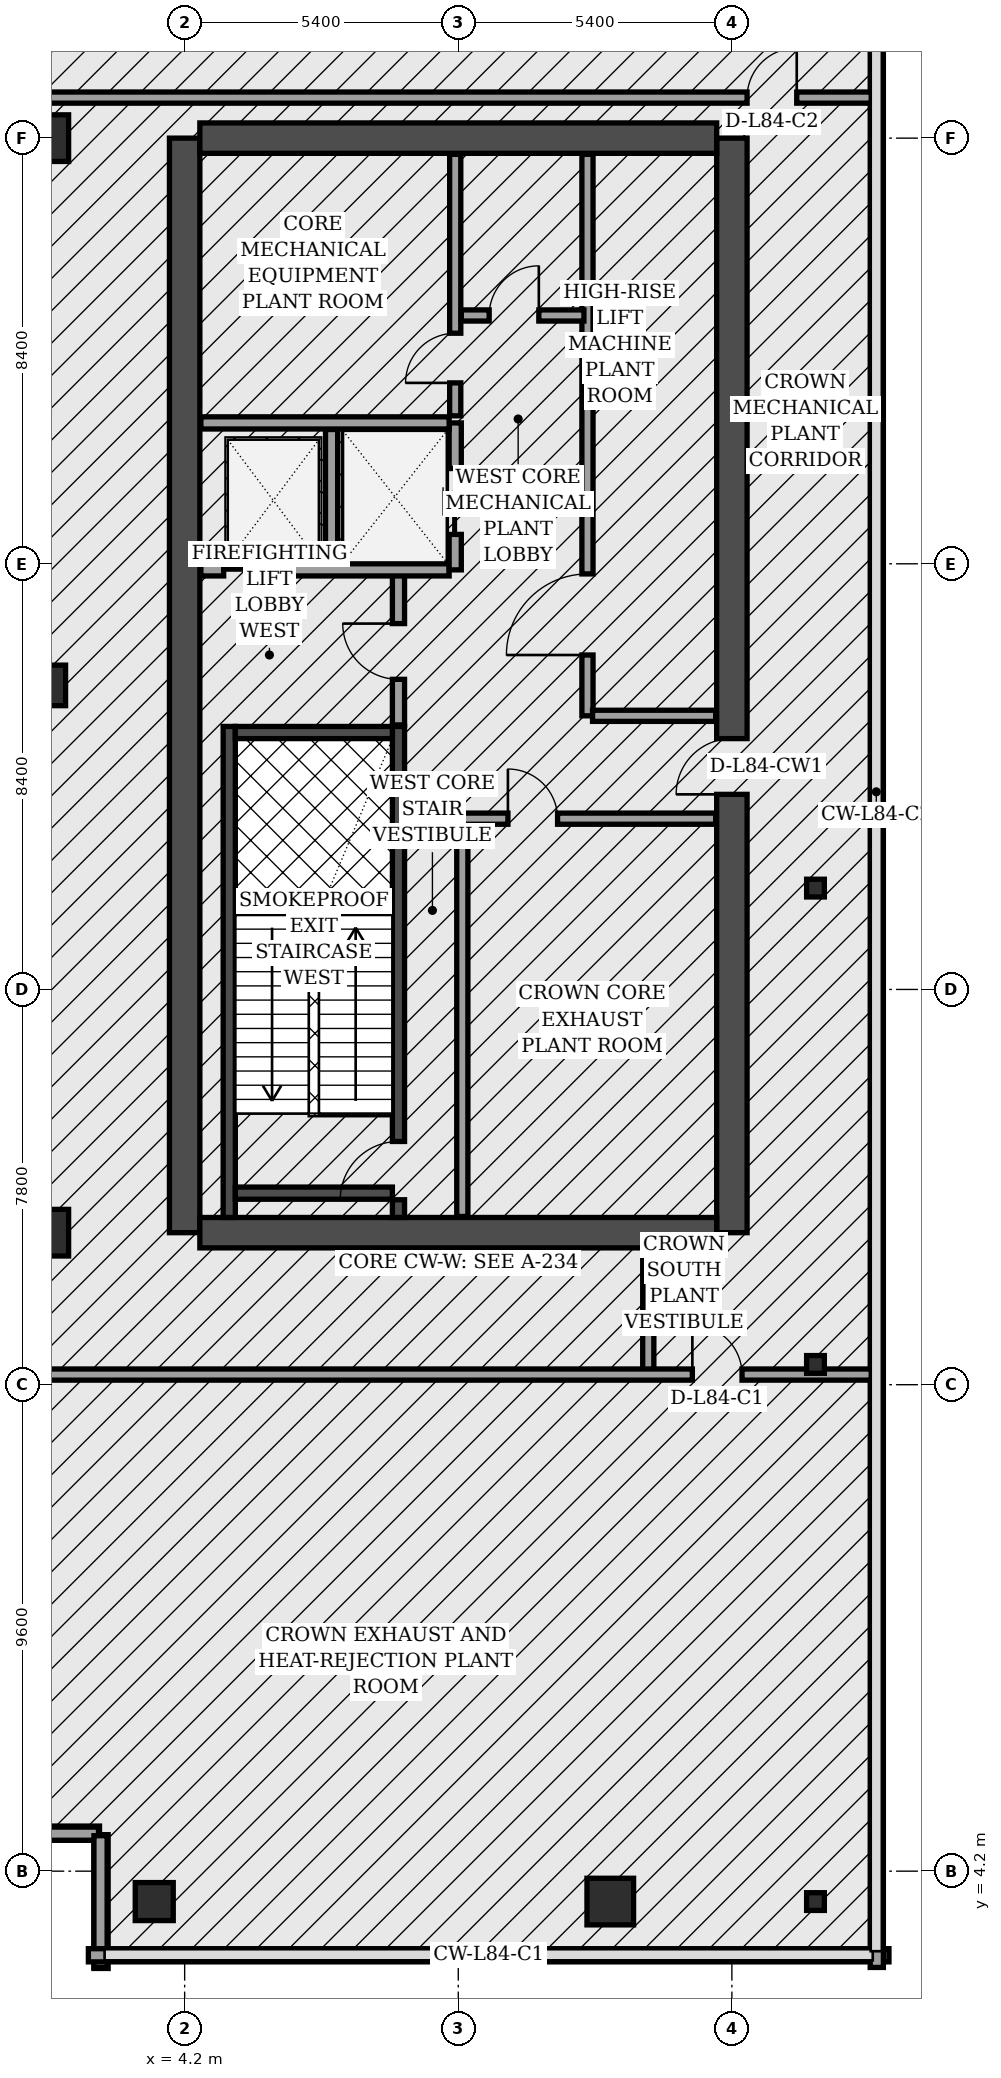
"""IFC4 building model, lengths in metres.
Left out: names, types, materials, properties, quantities, classifications, styles, units other than length and angle.
Written with IfcOpenShell. Run it as: python <this file> out.ifc"""

import sys

from ifc_helpers import new_model, si_unit, direction, frame, frame_2d, origin, origin_2d, place, context, subcontext, project, spatial, rectangle, hollow_rectangle, i_section, extrude, element, fill, save


model = new_model("IFC4")
c1 = context("Model", 3, precision=1e-05, world=origin(), true_north=direction((0.0, 1.0)))
c2 = subcontext(c1, "Body", "Model", "MODEL_VIEW")
j1 = project(units=[si_unit("LENGTHUNIT", "METRE"), si_unit("PLANEANGLEUNIT", "RADIAN")], contexts=[c1])
p1 = place(None, origin())
s1 = spatial("IfcSite", under=j1, at=p1, CompositionType="ELEMENT")
p2 = place(p1, origin())
s2 = spatial("IfcBuilding", under=s1, at=p2, CompositionType="ELEMENT")
p3 = place(p2, frame((0.0, 0.0, 345.5)))
s3 = spatial("IfcBuildingStorey", under=s2, at=p3, CompositionType="ELEMENT", Elevation=345.5)
p4 = place(p3, frame((4.2, 16.8, 0.0), z_axis=(0.0, 0.0, 1.0), x_axis=(0.0, 1.0, 0.0)))
e1 = element("IfcWall", 1, at=p4, inside=s3, PredefinedType="SHEAR", context=c2, shape_type="SweptSolid", body=[
    extrude(rectangle(XDim=21.6, YDim=0.6, at=frame_2d((10.8, 0.0))), origin(), (0.0, 0.0, 1.0), 4.75),
])
p5 = place(p3, frame((15.0, 16.8, 0.0), z_axis=(0.0, 0.0, 1.0), x_axis=(0.0, 1.0, 0.0)))
e2 = element("IfcWall", 2, at=p5, inside=s3, PredefinedType="SHEAR", context=c2, shape_type="SweptSolid", body=[
    extrude(rectangle(XDim=21.6, YDim=0.6, at=frame_2d((10.8, 0.0))), origin(), (0.0, 0.0, 1.0), 4.75),
])
p6 = place(p5, frame((8.65, 0.0, 0.0)))
e3 = element("IfcOpeningElement", 3, at=p6, cuts=e2, PredefinedType="OPENING", context=c2, shape_type="SweptSolid", body=[
    extrude(rectangle(XDim=1.1, YDim=2.2, at=frame_2d((0.55, 1.1))), frame((0.0, 0.31, 0.0), z_axis=(0.0, -1.0, 0.0), x_axis=(1.0, 0.0, 0.0)), (0.0, 0.0, 1.0), 0.62),
])
for number, where, z_axis, x_axis in (
    (4, (4.5, 38.4, 0.0), (0.0, 0.0, 1.0), (1.0, 0.0, 0.0)),
    (5, (4.5, 16.8, 0.0), (0.0, 0.0, 1.0), (1.0, 0.0, 0.0)),
):
    element("IfcWall", number, at=place(p3, frame(where, z_axis=z_axis, x_axis=x_axis)), inside=s3, PredefinedType="SHEAR", context=c2, shape_type="SweptSolid", body=[
        extrude(rectangle(XDim=10.2, YDim=0.6, at=frame_2d((5.1, 0.0))), origin(), (0.0, 0.0, 1.0), 4.75),
    ])
p7 = place(p3, frame((5.08, 17.1, 0.0), z_axis=(0.0, 0.0, 1.0), x_axis=(0.0, 1.0, 0.0)))
e6 = element("IfcWall", 6, at=p7, inside=s3, PredefinedType="SOLIDWALL", context=c2, shape_type="SweptSolid", body=[
    extrude(rectangle(XDim=9.69, YDim=0.24, at=frame_2d((4.845, 0.0))), origin(), (0.0, 0.0, 1.0), 4.75),
])
p8 = place(p3, frame((8.42, 17.1, 0.0), z_axis=(0.0, 0.0, 1.0), x_axis=(0.0, 1.0, 0.0)))
e7 = element("IfcWall", 7, at=p8, inside=s3, PredefinedType="SOLIDWALL", context=c2, shape_type="SweptSolid", body=[
    extrude(rectangle(XDim=9.69, YDim=0.24, at=frame_2d((4.845, 0.0))), origin(), (0.0, 0.0, 1.0), 4.75),
])
p9 = place(p8, frame((0.35, 0.0, 0.0)))
e8 = element("IfcOpeningElement", 8, at=p9, cuts=e7, PredefinedType="OPENING", context=c2, shape_type="SweptSolid", body=[
    extrude(rectangle(XDim=1.15, YDim=2.2, at=frame_2d((0.575, 1.1))), frame((0.0, 0.13, 0.0), z_axis=(0.0, -1.0, 0.0), x_axis=(1.0, 0.0, 0.0)), (0.0, 0.0, 1.0), 0.26),
])
for number, where, z_axis, x_axis in (
    (9, (5.2, 17.58, 0.0), (0.0, 0.0, 1.0), (1.0, 0.0, 0.0)),
    (10, (5.2, 26.67, 0.0), (0.0, 0.0, 1.0), (1.0, 0.0, 0.0)),
):
    element("IfcWall", number, at=place(p3, frame(where, z_axis=z_axis, x_axis=x_axis)), inside=s3, PredefinedType="SOLIDWALL", context=c2, shape_type="SweptSolid", body=[
        extrude(rectangle(XDim=3.1, YDim=0.24, at=frame_2d((1.55, 0.0))), origin(), (0.0, 0.0, 1.0), 4.75),
    ])
p10 = place(p3, frame((3.6, 3.6, 0.0), z_axis=(0.0, 0.0, 1.0), x_axis=(1.0, 0.0, 0.0)))
e11 = element("IfcColumn", 11, at=p10, inside=s3, PredefinedType="COLUMN", context=c2, shape_type="SweptSolid", body=[
    extrude(hollow_rectangle(XDim=0.75, YDim=0.75, WallThickness=0.032, at=origin_2d()), origin(), (0.0, 0.0, 1.0), 4.75),
])
p11 = place(p3, frame((1.45, 16.8, 0.0), z_axis=(0.0, 0.0, 1.0), x_axis=(1.0, 0.0, 0.0)))
e12 = element("IfcColumn", 12, at=p11, inside=s3, PredefinedType="COLUMN", context=c2, shape_type="SweptSolid", body=[
    extrude(rectangle(XDim=0.92, YDim=0.92, at=origin_2d()), origin(), (0.0, 0.0, 1.0), 4.75),
])
p12 = place(p3, frame((1.45, 27.6, 0.0), z_axis=(0.0, 0.0, 1.0), x_axis=(1.0, 0.0, 0.0)))
e13 = element("IfcColumn", 13, at=p12, inside=s3, PredefinedType="COLUMN", context=c2, shape_type="SweptSolid", body=[
    extrude(rectangle(XDim=0.8, YDim=0.8, at=origin_2d()), origin(), (0.0, 0.0, 1.0), 4.75),
])
for number, where, z_axis, x_axis in (
    (14, (1.45, 38.4, 0.0), (0.0, 0.0, 1.0), (1.0, 0.0, 0.0)),
    (15, (12.6, 3.6, 0.0), (0.0, 0.0, 1.0), (1.0, 0.0, 0.0)),
):
    element("IfcColumn", number, at=place(p3, frame(where, z_axis=z_axis, x_axis=x_axis)), inside=s3, PredefinedType="COLUMN", context=c2, shape_type="SweptSolid", body=[
        extrude(rectangle(XDim=0.92, YDim=0.92, at=origin_2d()), origin(), (0.0, 0.0, 1.0), 4.75),
    ])
for number, where, z_axis, x_axis in (
    (16, (16.65, 3.6, 0.0), (0.0, 0.0, 1.0), (1.0, 0.0, 0.0)),
    (17, (16.65, 14.2, 0.0), (0.0, 0.0, 1.0), (1.0, 0.0, 0.0)),
    (18, (16.65, 23.6, 0.0), (0.0, 0.0, 1.0), (1.0, 0.0, 0.0)),
):
    element("IfcColumn", number, at=place(p3, frame(where, z_axis=z_axis, x_axis=x_axis)), inside=s3, PredefinedType="COLUMN", context=c2, shape_type="SweptSolid", body=[
        extrude(i_section(OverallWidth=0.35, OverallDepth=0.35, WebThickness=0.012, FlangeThickness=0.019, FilletRadius=0.018, at=origin_2d()), origin(), (0.0, 0.0, 1.0), 4.75),
    ])
p13 = place(p3, frame((-0.12, 4.95, 0.0), z_axis=(0.0, 0.0, 1.0), x_axis=(1.0, 0.0, 0.0)))
e19 = element("IfcWall", 19, at=p13, inside=s3, PredefinedType="SOLIDWALL", context=c2, shape_type="SweptSolid", body=[
    extrude(rectangle(XDim=2.64, YDim=0.28, at=frame_2d((1.32, 0.0))), origin(), (0.0, 0.0, 1.0), 4.75),
])
p14 = place(p3, frame((2.55, 4.92, 0.0), z_axis=(0.0, 0.0, 1.0), x_axis=(0.0, -1.0, 0.0)))
e20 = element("IfcWall", 20, at=p14, inside=s3, PredefinedType="SOLIDWALL", context=c2, shape_type="SweptSolid", body=[
    extrude(rectangle(XDim=2.64, YDim=0.28, at=frame_2d((1.32, 0.0))), origin(), (0.0, 0.0, 1.0), 4.75),
])
p15 = place(p3, frame((-0.1, 4.94, 5.0), z_axis=(0.0, 0.0, 1.0), x_axis=(1.0, 0.0, 0.0)))
e21 = element("IfcWall", 21, at=p15, inside=s3, PredefinedType="PARAPET", context=c2, shape_type="SweptSolid", body=[
    extrude(rectangle(XDim=2.6, YDim=0.26, at=frame_2d((1.3, 0.0))), origin(), (0.0, 0.0, 1.0), 1.55),
])
p16 = place(p3, frame((2.54, 4.9, 5.0), z_axis=(0.0, 0.0, 1.0), x_axis=(0.0, -1.0, 0.0)))
e22 = element("IfcWall", 22, at=p16, inside=s3, PredefinedType="PARAPET", context=c2, shape_type="SweptSolid", body=[
    extrude(rectangle(XDim=2.6, YDim=0.26, at=frame_2d((1.3, 0.0))), origin(), (0.0, 0.0, 1.0), 1.55),
])
p17 = place(p3, frame((2.3, 2.54, 5.0), z_axis=(0.0, 0.0, 1.0), x_axis=(1.0, 0.0, 0.0)))
e23 = element("IfcWall", 23, at=p17, inside=s3, PredefinedType="PARAPET", context=c2, shape_type="SweptSolid", body=[
    extrude(rectangle(XDim=15.8, YDim=0.26, at=frame_2d((7.9, 0.0))), origin(), (0.0, 0.0, 1.0), 1.55),
])
p18 = place(p3, frame((17.86, 2.3, 5.0), z_axis=(0.0, 0.0, 1.0), x_axis=(0.0, 1.0, 0.0)))
e24 = element("IfcWall", 24, at=p18, inside=s3, PredefinedType="PARAPET", context=c2, shape_type="SweptSolid", body=[
    extrude(rectangle(XDim=46.4, YDim=0.26, at=frame_2d((23.2, 0.0))), origin(), (0.0, 0.0, 1.0), 1.55),
])
p19 = place(p3, frame((8.42, 26.82, 0.0), z_axis=(0.0, 0.0, 1.0), x_axis=(0.0, 1.0, 0.0)))
e25 = element("IfcWall", 25, at=p19, inside=s3, PredefinedType="SOLIDWALL", context=c2, shape_type="SweptSolid", body=[
    extrude(rectangle(XDim=3.0, YDim=0.24, at=frame_2d((1.5, 0.0))), origin(), (0.0, 0.0, 1.0), 4.75),
])
p20 = place(p19, frame((0.9, 0.0, 0.0)))
e26 = element("IfcOpeningElement", 26, at=p20, cuts=e25, PredefinedType="OPENING", context=c2, shape_type="SweptSolid", body=[
    extrude(rectangle(XDim=1.1, YDim=2.2, at=frame_2d((0.55, 1.1))), frame((0.0, 0.13, 0.0), z_axis=(0.0, -1.0, 0.0), x_axis=(1.0, 0.0, 0.0)), (0.0, 0.0, 1.0), 0.26),
])
p21 = place(p3, frame((4.52, 29.88, 0.0), z_axis=(0.0, 0.0, 1.0), x_axis=(1.0, 0.0, 0.0)))
e27 = element("IfcWall", 27, at=p21, inside=s3, PredefinedType="SOLIDWALL", context=c2, shape_type="SweptSolid", body=[
    extrude(rectangle(XDim=4.9, YDim=0.24, at=frame_2d((2.45, 0.0))), origin(), (0.0, 0.0, 1.0), 4.75),
])
p22 = place(p21, frame((0.45, 0.0, 0.0)))
e28 = element("IfcOpeningElement", 28, at=p22, cuts=e27, PredefinedType="OPENING", context=c2, shape_type="SweptSolid", body=[
    extrude(rectangle(XDim=1.3, YDim=2.35, at=frame_2d((0.65, 1.175))), frame((0.0, 0.13, 0.0), z_axis=(0.0, -1.0, 0.0), x_axis=(1.0, 0.0, 0.0)), (0.0, 0.0, 1.0), 0.26),
])
p23 = place(p3, frame((7.1, 30.02, 0.0), z_axis=(0.0, 0.0, 1.0), x_axis=(0.0, 1.0, 0.0)))
e29 = element("IfcWall", 29, at=p23, inside=s3, PredefinedType="SOLIDWALL", context=c2, shape_type="SweptSolid", body=[
    extrude(rectangle(XDim=2.63, YDim=0.24, at=frame_2d((1.315, 0.0))), origin(), (0.0, 0.0, 1.0), 4.75),
])
p24 = place(p3, frame((9.54, 29.88, 0.0), z_axis=(0.0, 0.0, 1.0), x_axis=(0.0, 1.0, 0.0)))
e30 = element("IfcWall", 30, at=p24, inside=s3, PredefinedType="SOLIDWALL", context=c2, shape_type="SweptSolid", body=[
    extrude(rectangle(XDim=2.9, YDim=0.24, at=frame_2d((1.45, 0.0))), origin(), (0.0, 0.0, 1.0), 4.75),
])
p25 = place(p24, frame((0.7, 0.0, 0.0)))
e31 = element("IfcOpeningElement", 31, at=p25, cuts=e30, PredefinedType="OPENING", context=c2, shape_type="SweptSolid", body=[
    extrude(rectangle(XDim=1.3, YDim=2.35, at=frame_2d((0.65, 1.175))), frame((0.0, 0.13, 0.0), z_axis=(0.0, -1.0, 0.0), x_axis=(1.0, 0.0, 0.0)), (0.0, 0.0, 1.0), 0.26),
])
p26 = place(p3, frame((4.52, 32.78, 0.0), z_axis=(0.0, 0.0, 1.0), x_axis=(1.0, 0.0, 0.0)))
e32 = element("IfcWall", 32, at=p26, inside=s3, PredefinedType="SOLIDWALL", context=c2, shape_type="SweptSolid", body=[
    extrude(rectangle(XDim=4.9, YDim=0.24, at=frame_2d((2.45, 0.0))), origin(), (0.0, 0.0, 1.0), 4.75),
])
p27 = place(p3, frame((9.68, 17.12, 0.0), z_axis=(0.0, 0.0, 1.0), x_axis=(0.0, 1.0, 0.0)))
e33 = element("IfcWall", 33, at=p27, inside=s3, PredefinedType="SOLIDWALL", context=c2, shape_type="SweptSolid", body=[
    extrude(rectangle(XDim=7.88, YDim=0.22, at=frame_2d((3.94, 0.0))), origin(), (0.0, 0.0, 1.0), 4.75),
])
p28 = place(p3, frame((9.54, 32.92, 0.0), z_axis=(0.0, 0.0, 1.0), x_axis=(0.0, 1.0, 0.0)))
e34 = element("IfcWall", 34, at=p28, inside=s3, PredefinedType="SOLIDWALL", context=c2, shape_type="SweptSolid", body=[
    extrude(rectangle(XDim=5.16, YDim=0.22, at=frame_2d((2.58, 0.0))), origin(), (0.0, 0.0, 1.0), 4.75),
])
p29 = place(p28, frame((0.65, 0.0, 0.0)))
e35 = element("IfcOpeningElement", 35, at=p29, cuts=e34, PredefinedType="OPENING", context=c2, shape_type="SweptSolid", body=[
    extrude(rectangle(XDim=0.98, YDim=2.15, at=frame_2d((0.49, 1.075))), frame((0.0, 0.12, 0.0), z_axis=(0.0, -1.0, 0.0), x_axis=(1.0, 0.0, 0.0)), (0.0, 0.0, 1.0), 0.24),
])
p30 = place(p3, frame((9.68, 24.97, 0.0), z_axis=(0.0, 0.0, 1.0), x_axis=(1.0, 0.0, 0.0)))
e36 = element("IfcWall", 36, at=p30, inside=s3, PredefinedType="SOLIDWALL", context=c2, shape_type="SweptSolid", body=[
    extrude(rectangle(XDim=5.0, YDim=0.22, at=frame_2d((2.5, 0.0))), origin(), (0.0, 0.0, 1.0), 4.75),
])
p31 = place(p30, frame((0.9, 0.0, 0.0)))
e37 = element("IfcOpeningElement", 37, at=p31, cuts=e36, PredefinedType="OPENING", context=c2, shape_type="SweptSolid", body=[
    extrude(rectangle(XDim=0.98, YDim=2.15, at=frame_2d((0.49, 1.075))), frame((0.0, 0.12, 0.0), z_axis=(0.0, -1.0, 0.0), x_axis=(1.0, 0.0, 0.0)), (0.0, 0.0, 1.0), 0.24),
])
p32 = place(p3, frame((12.15, 27.0, 0.0), z_axis=(0.0, 0.0, 1.0), x_axis=(0.0, 1.0, 0.0)))
e38 = element("IfcWall", 38, at=p32, inside=s3, PredefinedType="SOLIDWALL", context=c2, shape_type="SweptSolid", body=[
    extrude(rectangle(XDim=11.08, YDim=0.22, at=frame_2d((5.54, 0.0))), origin(), (0.0, 0.0, 1.0), 4.75),
])
p33 = place(p32, frame((1.2, 0.0, 0.0)))
e39 = element("IfcOpeningElement", 39, at=p33, cuts=e38, PredefinedType="OPENING", context=c2, shape_type="SweptSolid", body=[
    extrude(rectangle(XDim=1.6, YDim=2.35, at=frame_2d((0.8, 1.175))), frame((0.0, 0.12, 0.0), z_axis=(0.0, -1.0, 0.0), x_axis=(1.0, 0.0, 0.0)), (0.0, 0.0, 1.0), 0.24),
])
p34 = place(p3, frame((12.25, 27.0, 0.0), z_axis=(0.0, 0.0, 1.0), x_axis=(1.0, 0.0, 0.0)))
e40 = element("IfcWall", 40, at=p34, inside=s3, PredefinedType="SOLIDWALL", context=c2, shape_type="SweptSolid", body=[
    extrude(rectangle(XDim=2.43, YDim=0.22, at=frame_2d((1.215, 0.0))), origin(), (0.0, 0.0, 1.0), 4.75),
])
p35 = place(p3, frame((9.66, 34.9, 0.0), z_axis=(0.0, 0.0, 1.0), x_axis=(1.0, 0.0, 0.0)))
e41 = element("IfcWall", 41, at=p35, inside=s3, PredefinedType="SOLIDWALL", context=c2, shape_type="SweptSolid", body=[
    extrude(rectangle(XDim=2.42, YDim=0.22, at=frame_2d((1.21, 0.0))), origin(), (0.0, 0.0, 1.0), 4.75),
])
p36 = place(p35, frame((0.55, 0.0, 0.0)))
e42 = element("IfcOpeningElement", 42, at=p36, cuts=e41, PredefinedType="OPENING", context=c2, shape_type="SweptSolid", body=[
    extrude(rectangle(XDim=0.98, YDim=2.15, at=frame_2d((0.49, 1.075))), frame((0.0, 0.12, 0.0), z_axis=(0.0, -1.0, 0.0), x_axis=(1.0, 0.0, 0.0)), (0.0, 0.0, 1.0), 0.24),
])
p37 = place(p3, frame((13.35, 14.0, 0.0), z_axis=(0.0, 0.0, 1.0), x_axis=(0.0, 1.0, 0.0)))
e43 = element("IfcWall", 43, at=p37, inside=s3, PredefinedType="SOLIDWALL", context=c2, shape_type="SweptSolid", body=[
    extrude(rectangle(XDim=2.42, YDim=0.22, at=frame_2d((1.21, 0.0))), origin(), (0.0, 0.0, 1.0), 4.75),
])
p38 = place(p3, frame((0.08, 14.0, 0.0), z_axis=(0.0, 0.0, 1.0), x_axis=(1.0, 0.0, 0.0)))
e44 = element("IfcWall", 44, at=p38, inside=s3, PredefinedType="SOLIDWALL", context=c2, shape_type="SweptSolid", body=[
    extrude(rectangle(XDim=17.67, YDim=0.22, at=frame_2d((8.835, 0.0))), origin(), (0.0, 0.0, 1.0), 4.03),
])
p39 = place(p38, frame((14.14, 0.0, 0.0)))
e45 = element("IfcOpeningElement", 45, at=p39, cuts=e44, PredefinedType="OPENING", context=c2, shape_type="SweptSolid", body=[
    extrude(rectangle(XDim=0.98, YDim=2.15, at=frame_2d((0.49, 1.075))), frame((0.0, 0.12, 0.0), z_axis=(0.0, -1.0, 0.0), x_axis=(1.0, 0.0, 0.0)), (0.0, 0.0, 1.0), 0.24),
])
p40 = place(p3, frame((0.08, 39.2, 0.0), z_axis=(0.0, 0.0, 1.0), x_axis=(1.0, 0.0, 0.0)))
e46 = element("IfcWall", 46, at=p40, inside=s3, PredefinedType="SOLIDWALL", context=c2, shape_type="SweptSolid", body=[
    extrude(rectangle(XDim=17.67, YDim=0.22, at=frame_2d((8.835, 0.0))), origin(), (0.0, 0.0, 1.0), 4.03),
])
p41 = place(p40, frame((15.22, 0.0, 0.0)))
e47 = element("IfcOpeningElement", 47, at=p41, cuts=e46, PredefinedType="OPENING", context=c2, shape_type="SweptSolid", body=[
    extrude(rectangle(XDim=0.98, YDim=2.15, at=frame_2d((0.49, 1.075))), frame((0.0, 0.12, 0.0), z_axis=(0.0, -1.0, 0.0), x_axis=(1.0, 0.0, 0.0)), (0.0, 0.0, 1.0), 0.24),
])
p42 = place(p20, origin())
e48 = element("IfcDoor", 48, at=p42, inside=s3, OperationType="SINGLE_SWING_RIGHT", PredefinedType="DOOR", context=c2, shape_type="SweptSolid", body=[
    extrude(rectangle(XDim=1.1, YDim=2.2, at=frame_2d((0.55, 1.1))), frame((0.0, 0.025, 0.0), z_axis=(0.0, -1.0, 0.0), x_axis=(1.0, 0.0, 0.0)), (0.0, 0.0, 1.0), 0.05),
])
fill(e26, e48)
p43 = place(p22, origin())
e49 = element("IfcDoor", 49, at=p43, inside=s3, OperationType="DOUBLE_DOOR_SLIDING", PredefinedType="DOOR", context=c2, shape_type="SweptSolid", body=[
    extrude(rectangle(XDim=1.3, YDim=2.35, at=frame_2d((0.65, 1.175))), frame((0.0, 0.025, 0.0), z_axis=(0.0, -1.0, 0.0), x_axis=(1.0, 0.0, 0.0)), (0.0, 0.0, 1.0), 0.05),
])
fill(e28, e49)
p44 = place(p25, origin())
e50 = element("IfcDoor", 50, at=p44, inside=s3, OperationType="DOUBLE_DOOR_SLIDING", PredefinedType="DOOR", context=c2, shape_type="SweptSolid", body=[
    extrude(rectangle(XDim=1.3, YDim=2.35, at=frame_2d((0.65, 1.175))), frame((0.0, 0.025, 0.0), z_axis=(0.0, -1.0, 0.0), x_axis=(1.0, 0.0, 0.0)), (0.0, 0.0, 1.0), 0.05),
])
fill(e31, e50)
p45 = place(p29, origin())
e51 = element("IfcDoor", 51, at=p45, inside=s3, OperationType="SINGLE_SWING_LEFT", PredefinedType="DOOR", context=c2, shape_type="SweptSolid", body=[
    extrude(rectangle(XDim=0.98, YDim=2.15, at=frame_2d((0.49, 1.075))), frame((0.0, 0.025, 0.0), z_axis=(0.0, -1.0, 0.0), x_axis=(1.0, 0.0, 0.0)), (0.0, 0.0, 1.0), 0.05),
])
fill(e35, e51)
p46 = place(p31, origin())
e52 = element("IfcDoor", 52, at=p46, inside=s3, OperationType="SINGLE_SWING_LEFT", PredefinedType="DOOR", context=c2, shape_type="SweptSolid", body=[
    extrude(rectangle(XDim=0.98, YDim=2.15, at=frame_2d((0.49, 1.075))), frame((0.0, 0.025, 0.0), z_axis=(0.0, -1.0, 0.0), x_axis=(1.0, 0.0, 0.0)), (0.0, 0.0, 1.0), 0.05),
])
fill(e37, e52)
p47 = place(p33, origin())
e53 = element("IfcDoor", 53, at=p47, inside=s3, OperationType="SINGLE_SWING_LEFT", PredefinedType="DOOR", context=c2, shape_type="SweptSolid", body=[
    extrude(rectangle(XDim=1.6, YDim=2.35, at=frame_2d((0.8, 1.175))), frame((0.0, 0.025, 0.0), z_axis=(0.0, -1.0, 0.0), x_axis=(1.0, 0.0, 0.0)), (0.0, 0.0, 1.0), 0.05),
])
fill(e39, e53)
p48 = place(p36, origin())
e54 = element("IfcDoor", 54, at=p48, inside=s3, OperationType="SINGLE_SWING_RIGHT", PredefinedType="DOOR", context=c2, shape_type="SweptSolid", body=[
    extrude(rectangle(XDim=0.98, YDim=2.15, at=frame_2d((0.49, 1.075))), frame((0.0, 0.025, 0.0), z_axis=(0.0, -1.0, 0.0), x_axis=(1.0, 0.0, 0.0)), (0.0, 0.0, 1.0), 0.05),
])
fill(e42, e54)
p49 = place(p39, origin())
e55 = element("IfcDoor", 55, at=p49, inside=s3, OperationType="SINGLE_SWING_LEFT", PredefinedType="DOOR", context=c2, shape_type="SweptSolid", body=[
    extrude(rectangle(XDim=0.98, YDim=2.15, at=frame_2d((0.49, 1.075))), frame((0.0, 0.025, 0.0), z_axis=(0.0, -1.0, 0.0), x_axis=(1.0, 0.0, 0.0)), (0.0, 0.0, 1.0), 0.05),
])
fill(e45, e55)
p50 = place(p41, origin())
e56 = element("IfcDoor", 56, at=p50, inside=s3, OperationType="SINGLE_SWING_RIGHT", PredefinedType="DOOR", context=c2, shape_type="SweptSolid", body=[
    extrude(rectangle(XDim=0.98, YDim=2.15, at=frame_2d((0.49, 1.075))), frame((0.0, 0.025, 0.0), z_axis=(0.0, -1.0, 0.0), x_axis=(1.0, 0.0, 0.0)), (0.0, 0.0, 1.0), 0.05),
])
fill(e47, e56)
p51 = place(p9, origin())
e57 = element("IfcDoor", 57, at=p51, inside=s3, OperationType="SINGLE_SWING_LEFT", PredefinedType="DOOR", context=c2, shape_type="SweptSolid", body=[
    extrude(rectangle(XDim=1.15, YDim=2.2, at=frame_2d((0.575, 1.1))), frame((0.0, 0.025, 0.0), z_axis=(0.0, -1.0, 0.0), x_axis=(1.0, 0.0, 0.0)), (0.0, 0.0, 1.0), 0.05),
])
fill(e8, e57)
p52 = place(p6, origin())
e58 = element("IfcDoor", 58, at=p52, inside=s3, OperationType="SINGLE_SWING_LEFT", PredefinedType="DOOR", context=c2, shape_type="SweptSolid", body=[
    extrude(rectangle(XDim=1.1, YDim=2.2, at=frame_2d((0.55, 1.1))), frame((0.0, 0.025, 0.0), z_axis=(0.0, -1.0, 0.0), x_axis=(1.0, 0.0, 0.0)), (0.0, 0.0, 1.0), 0.05),
])
fill(e3, e58)
save(model, sys.argv[1])
